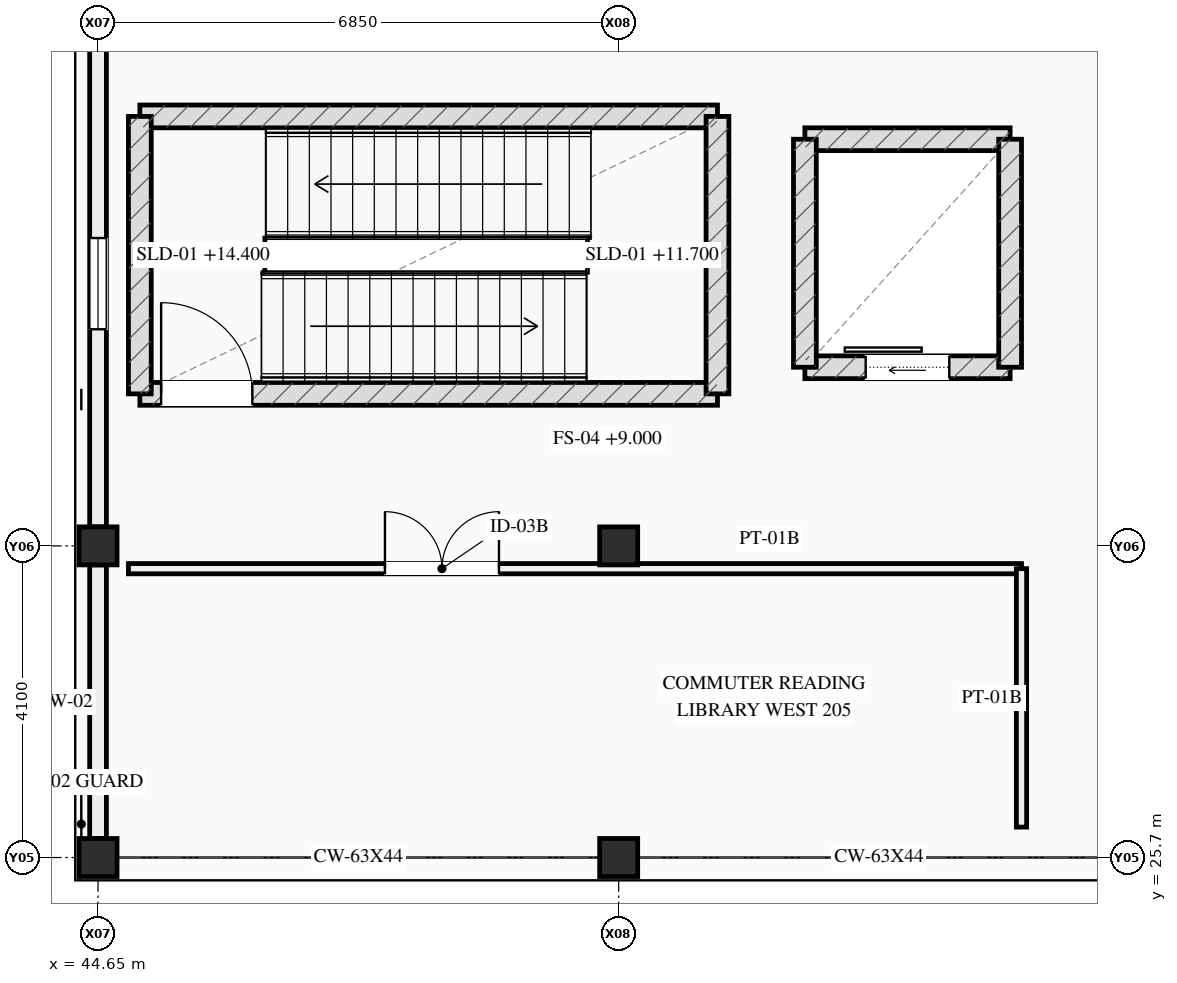
"""IFC4 building model, lengths in metres.
Left out: names, types, materials, properties, quantities, classifications, styles, units other than length and angle.
Written with IfcOpenShell. Run it as: python <this file> out.ifc"""

import sys

from ifc_helpers import new_model, si_unit, direction, frame, frame_2d, origin, origin_2d, place, context, subcontext, project, spatial, rectangle, extrude, element, fill, save


model = new_model("IFC4")
c1 = context("Model", 3, precision=1e-05, world=origin(), true_north=direction((0.0, 1.0)))
c2 = subcontext(c1, "Body", "Model", "MODEL_VIEW")
j1 = project(units=[si_unit("LENGTHUNIT", "METRE"), si_unit("PLANEANGLEUNIT", "RADIAN")], contexts=[c1])
p1 = place(None, origin())
s1 = spatial("IfcSite", under=j1, at=p1, CompositionType="ELEMENT")
p2 = place(p1, origin())
s2 = spatial("IfcBuilding", under=s1, at=p2, CompositionType="ELEMENT")
p3 = place(p2, frame((0.0, 0.0, 9.0)))
s3 = spatial("IfcBuildingStorey", under=s2, at=p3, CompositionType="ELEMENT", Elevation=9.0)
for number, where, z_axis, x_axis in (
    (1, (44.65, 25.7, 0.0), (0.0, 0.0, 1.0), (1.0, 0.0, 0.0)),
    (2, (44.65, 29.8, 0.0), (0.0, 0.0, 1.0), (1.0, 0.0, 0.0)),
    (3, (51.5, 25.7, 0.0), (0.0, 0.0, 1.0), (1.0, 0.0, 0.0)),
    (4, (51.5, 29.8, 0.0), (0.0, 0.0, 1.0), (1.0, 0.0, 0.0)),
):
    element("IfcColumn", number, at=place(p3, frame(where, z_axis=z_axis, x_axis=x_axis)), inside=s3, PredefinedType="COLUMN", context=c2, shape_type="SweptSolid", body=[
        extrude(rectangle(XDim=0.5, YDim=0.5, at=origin_2d()), origin(), (0.0, 0.0, 1.0), 5.4),
    ])
p4 = place(p3, frame((44.65, 25.95, 0.0), z_axis=(0.0, 0.0, 1.0), x_axis=(0.0, 1.0, 0.0)))
e5 = element("IfcWall", 5, at=p4, inside=s3, PredefinedType="STANDARD", context=c2, shape_type="SweptSolid", body=[
    extrude(rectangle(XDim=3.6, YDim=0.22, at=frame_2d((1.8, 0.0))), origin(), (0.0, 0.0, 1.0), 4.48),
])
p5 = place(p3, frame((44.65, 30.05, 0.0), z_axis=(0.0, 0.0, 1.0), x_axis=(0.0, 1.0, 0.0)))
e6 = element("IfcWall", 6, at=p5, inside=s3, PredefinedType="STANDARD", context=c2, shape_type="SweptSolid", body=[
    extrude(rectangle(XDim=6.4, YDim=0.22, at=frame_2d((3.2, 0.0))), origin(), (0.0, 0.0, 1.0), 4.48),
])
p6 = place(p5, frame((2.6, 0.0, 1.0)))
e7 = element("IfcOpeningElement", 7, at=p6, cuts=e6, PredefinedType="OPENING", context=c2, shape_type="SweptSolid", body=[
    extrude(rectangle(XDim=1.2, YDim=1.35, at=frame_2d((0.6, 0.675))), frame((0.0, 0.12, 0.0), z_axis=(0.0, -1.0, 0.0), x_axis=(1.0, 0.0, 0.0)), (0.0, 0.0, 1.0), 0.24),
])
p7 = place(p3, frame((45.2, 31.8, 0.0), z_axis=(0.0, 0.0, 1.0), x_axis=(1.0, 0.0, 0.0)))
e8 = element("IfcWall", 8, at=p7, inside=s3, PredefinedType="SHEAR", context=c2, shape_type="SweptSolid", body=[
    extrude(rectangle(XDim=7.6, YDim=0.3, at=frame_2d((3.8, 0.0))), origin(), (0.0, 0.0, 1.0), 5.175),
])
p8 = place(p7, frame((0.28, 0.0, 0.0)))
e9 = element("IfcOpeningElement", 9, at=p8, cuts=e8, PredefinedType="OPENING", context=c2, shape_type="SweptSolid", body=[
    extrude(rectangle(XDim=1.2, YDim=2.2, at=frame_2d((0.6, 1.1))), frame((0.0, 0.16, 0.0), z_axis=(0.0, -1.0, 0.0), x_axis=(1.0, 0.0, 0.0)), (0.0, 0.0, 1.0), 0.32),
])
p9 = place(p3, frame((52.8, 35.45, 0.0), z_axis=(0.0, 0.0, 1.0), x_axis=(-1.0, 0.0, 0.0)))
e10 = element("IfcWall", 10, at=p9, inside=s3, PredefinedType="SHEAR", context=c2, shape_type="SweptSolid", body=[
    extrude(rectangle(XDim=7.6, YDim=0.3, at=frame_2d((3.8, 0.0))), origin(), (0.0, 0.0, 1.0), 5.175),
])
for number, where, z_axis, x_axis in (
    (11, (45.2, 35.45, 0.0), (0.0, 0.0, 1.0), (0.0, -1.0, 0.0)),
    (12, (52.8, 31.8, 0.0), (0.0, 0.0, 1.0), (0.0, 1.0, 0.0)),
):
    element("IfcWall", number, at=place(p3, frame(where, z_axis=z_axis, x_axis=x_axis)), inside=s3, PredefinedType="SHEAR", context=c2, shape_type="SweptSolid", body=[
        extrude(rectangle(XDim=3.65, YDim=0.3, at=frame_2d((1.825, 0.0))), origin(), (0.0, 0.0, 1.0), 5.175),
    ])
p10 = place(p3, frame((53.95, 32.15, 0.0), z_axis=(0.0, 0.0, 1.0), x_axis=(1.0, 0.0, 0.0)))
e13 = element("IfcWall", 13, at=p10, inside=s3, PredefinedType="SHEAR", context=c2, shape_type="SweptSolid", body=[
    extrude(rectangle(XDim=2.7, YDim=0.3, at=frame_2d((1.35, 0.0))), origin(), (0.0, 0.0, 1.0), 5.175),
])
p11 = place(p10, frame((0.8, 0.0, 0.0)))
e14 = element("IfcOpeningElement", 14, at=p11, cuts=e13, PredefinedType="OPENING", context=c2, shape_type="SweptSolid", body=[
    extrude(rectangle(XDim=1.1, YDim=2.2, at=frame_2d((0.55, 1.1))), frame((0.0, 0.16, 0.0), z_axis=(0.0, -1.0, 0.0), x_axis=(1.0, 0.0, 0.0)), (0.0, 0.0, 1.0), 0.32),
])
p12 = place(p3, frame((53.95, 35.15, 0.0), z_axis=(0.0, 0.0, 1.0), x_axis=(1.0, 0.0, 0.0)))
e15 = element("IfcWall", 15, at=p12, inside=s3, PredefinedType="SHEAR", context=c2, shape_type="SweptSolid", body=[
    extrude(rectangle(XDim=2.7, YDim=0.3, at=frame_2d((1.35, 0.0))), origin(), (0.0, 0.0, 1.0), 5.175),
])
for number, where, z_axis, x_axis in (
    (16, (53.95, 32.15, 0.0), (0.0, 0.0, 1.0), (0.0, 1.0, 0.0)),
    (17, (56.65, 32.15, 0.0), (0.0, 0.0, 1.0), (0.0, 1.0, 0.0)),
):
    element("IfcWall", number, at=place(p3, frame(where, z_axis=z_axis, x_axis=x_axis)), inside=s3, PredefinedType="SHEAR", context=c2, shape_type="SweptSolid", body=[
        extrude(rectangle(XDim=3.0, YDim=0.3, at=frame_2d((1.5, 0.0))), origin(), (0.0, 0.0, 1.0), 5.175),
    ])
p13 = place(p3, frame((45.05, 29.5, 0.0), z_axis=(0.0, 0.0, 1.0), x_axis=(1.0, 0.0, 0.0)))
e18 = element("IfcWall", 18, at=p13, inside=s3, PredefinedType="PARTITIONING", context=c2, shape_type="SweptSolid", body=[
    extrude(rectangle(XDim=11.75, YDim=0.135, at=frame_2d((5.875, 0.0))), origin(), (0.0, 0.0, 1.0), 3.3),
])
p14 = place(p13, frame((3.375, 0.0, 0.0)))
e19 = element("IfcOpeningElement", 19, at=p14, cuts=e18, PredefinedType="OPENING", context=c2, shape_type="SweptSolid", body=[
    extrude(rectangle(XDim=1.5, YDim=2.2, at=frame_2d((0.75, 1.1))), frame((0.0, 0.077, 0.0), z_axis=(0.0, -1.0, 0.0), x_axis=(1.0, 0.0, 0.0)), (0.0, 0.0, 1.0), 0.155),
])
p15 = place(p3, frame((56.8, 26.1, 0.0), z_axis=(0.0, 0.0, 1.0), x_axis=(0.0, 1.0, 0.0)))
e20 = element("IfcWall", 20, at=p15, inside=s3, PredefinedType="PARTITIONING", context=c2, shape_type="SweptSolid", body=[
    extrude(rectangle(XDim=3.4, YDim=0.135, at=frame_2d((1.7, 0.0))), origin(), (0.0, 0.0, 1.0), 3.3),
])
p16 = place(p6, origin())
e21 = element("IfcWindow", 21, at=p16, inside=s3, PartitioningType="SINGLE_PANEL", PredefinedType="WINDOW", context=c2, shape_type="SweptSolid", body=[
    extrude(rectangle(XDim=1.2, YDim=1.35, at=frame_2d((0.6, 0.675))), frame((0.0, 0.03, 0.0), z_axis=(0.0, -1.0, 0.0), x_axis=(1.0, 0.0, 0.0)), (0.0, 0.0, 1.0), 0.06),
])
fill(e7, e21)
p17 = place(p8, origin())
e22 = element("IfcDoor", 22, at=p17, inside=s3, OperationType="SINGLE_SWING_LEFT", PredefinedType="DOOR", context=c2, shape_type="SweptSolid", body=[
    extrude(rectangle(XDim=1.2, YDim=2.2, at=frame_2d((0.6, 1.1))), frame((0.0, 0.025, 0.0), z_axis=(0.0, -1.0, 0.0), x_axis=(1.0, 0.0, 0.0)), (0.0, 0.0, 1.0), 0.05),
])
fill(e9, e22)
p18 = place(p11, origin())
e23 = element("IfcDoor", 23, at=p18, inside=s3, OperationType="SLIDING_TO_LEFT", PredefinedType="DOOR", context=c2, shape_type="SweptSolid", body=[
    extrude(rectangle(XDim=1.1, YDim=2.2, at=frame_2d((0.55, 1.1))), frame((0.0, 0.025, 0.0), z_axis=(0.0, -1.0, 0.0), x_axis=(1.0, 0.0, 0.0)), (0.0, 0.0, 1.0), 0.05),
])
fill(e14, e23)
p19 = place(p14, origin())
e24 = element("IfcDoor", 24, at=p19, inside=s3, OperationType="DOUBLE_DOOR_SINGLE_SWING", PredefinedType="DOOR", context=c2, shape_type="SweptSolid", body=[
    extrude(rectangle(XDim=1.5, YDim=2.2, at=frame_2d((0.75, 1.1))), frame((0.0, 0.025, 0.0), z_axis=(0.0, -1.0, 0.0), x_axis=(1.0, 0.0, 0.0)), (0.0, 0.0, 1.0), 0.05),
])
fill(e19, e24)
save(model, sys.argv[1])
